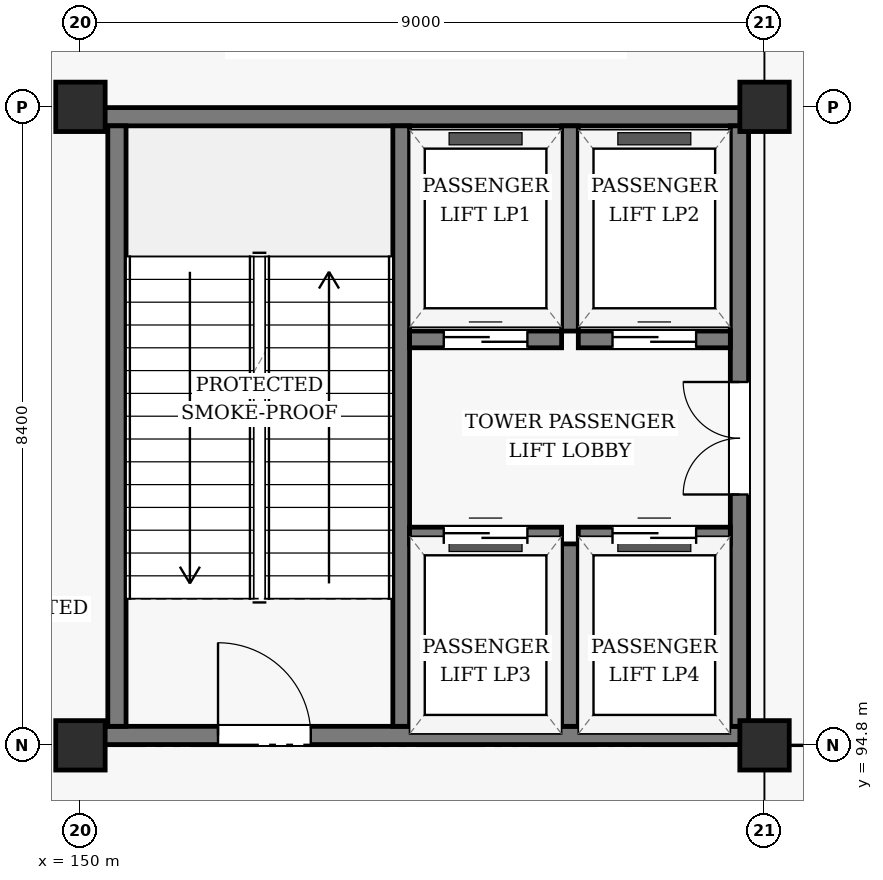
"""IFC4 building model, lengths in metres.
Left out: names, types, materials, properties, quantities, classifications, styles, units other than length and angle.
Written with IfcOpenShell. Run it as: python <this file> out.ifc"""

import sys

from ifc_helpers import new_model, si_unit, direction, frame, frame_2d, origin, origin_2d, place, context, subcontext, project, spatial, rectangle, hollow_rectangle, extrude, element, fill, save


model = new_model("IFC4")
c1 = context("Model", 3, precision=1e-05, world=origin(), true_north=direction((0.0, 1.0)))
c2 = subcontext(c1, "Body", "Model", "MODEL_VIEW")
j1 = project(units=[si_unit("LENGTHUNIT", "METRE"), si_unit("PLANEANGLEUNIT", "RADIAN")], contexts=[c1])
p1 = place(None, origin())
s1 = spatial("IfcSite", under=j1, at=p1, CompositionType="ELEMENT")
p2 = place(p1, origin())
s2 = spatial("IfcBuilding", under=s1, at=p2, CompositionType="ELEMENT")
p3 = place(p2, origin())
s3 = spatial("IfcBuildingStorey", under=s2, at=p3, CompositionType="ELEMENT", Elevation=0.0)
for number, where, z_axis, x_axis in (
    (1, (150.0, 94.8, 0.0), (0.0, 0.0, 1.0), (1.0, 0.0, 0.0)),
    (2, (150.0, 103.2, 0.0), (0.0, 0.0, 1.0), (1.0, 0.0, 0.0)),
    (3, (159.0, 94.8, 0.0), (0.0, 0.0, 1.0), (1.0, 0.0, 0.0)),
    (4, (159.0, 103.2, 0.0), (0.0, 0.0, 1.0), (1.0, 0.0, 0.0)),
):
    element("IfcColumn", number, at=place(p3, frame(where, z_axis=z_axis, x_axis=x_axis)), inside=s3, PredefinedType="COLUMN", context=c2, shape_type="SweptSolid", body=[
        extrude(hollow_rectangle(XDim=0.65, YDim=0.65, WallThickness=0.028, InnerFilletRadius=0.028, OuterFilletRadius=0.056, at=origin_2d()), origin(), (0.0, 0.0, 1.0), 4.8),
    ])
p4 = place(p3, frame((150.02, 94.93, 0.0), z_axis=(0.0, 0.0, 1.0), x_axis=(1.0, 0.0, 0.0)))
e5 = element("IfcWall", 5, at=p4, inside=s3, PredefinedType="SHEAR", context=c2, shape_type="SweptSolid", body=[
    extrude(rectangle(XDim=8.77, YDim=0.24, at=frame_2d((4.385, 0.0))), origin(), (0.0, 0.0, 1.0), 4.56),
])
p5 = place(p4, frame((1.79, 0.0, 0.0)))
e6 = element("IfcOpeningElement", 6, at=p5, cuts=e5, PredefinedType="OPENING", context=c2, shape_type="SweptSolid", body=[
    extrude(rectangle(XDim=1.22, YDim=2.18, at=frame_2d((0.61, 1.09))), frame((0.0, 0.13, 0.0), z_axis=(0.0, -1.0, 0.0), x_axis=(1.0, 0.0, 0.0)), (0.0, 0.0, 1.0), 0.26),
])
p6 = place(p3, frame((150.02, 103.07, 0.0), z_axis=(0.0, 0.0, 1.0), x_axis=(1.0, 0.0, 0.0)))
e7 = element("IfcWall", 7, at=p6, inside=s3, PredefinedType="SHEAR", context=c2, shape_type="SweptSolid", body=[
    extrude(rectangle(XDim=8.77, YDim=0.24, at=frame_2d((4.385, 0.0))), origin(), (0.0, 0.0, 1.0), 4.56),
])
p7 = place(p3, frame((150.48, 95.05, 0.0), z_axis=(0.0, 0.0, 1.0), x_axis=(0.0, 1.0, 0.0)))
e8 = element("IfcWall", 8, at=p7, inside=s3, PredefinedType="SHEAR", context=c2, shape_type="SweptSolid", body=[
    extrude(rectangle(XDim=7.9, YDim=0.24, at=frame_2d((3.95, 0.0))), origin(), (0.0, 0.0, 1.0), 4.56),
])
p8 = place(p3, frame((154.22, 95.05, 0.0), z_axis=(0.0, 0.0, 1.0), x_axis=(0.0, 1.0, 0.0)))
e9 = element("IfcWall", 9, at=p8, inside=s3, PredefinedType="SHEAR", context=c2, shape_type="SweptSolid", body=[
    extrude(rectangle(XDim=7.9, YDim=0.22, at=frame_2d((3.95, 0.0))), origin(), (0.0, 0.0, 1.0), 4.56),
])
p9 = place(p3, frame((158.67, 95.05, 0.0), z_axis=(0.0, 0.0, 1.0), x_axis=(0.0, 1.0, 0.0)))
e10 = element("IfcWall", 10, at=p9, inside=s3, PredefinedType="SHEAR", context=c2, shape_type="SweptSolid", body=[
    extrude(rectangle(XDim=7.9, YDim=0.24, at=frame_2d((3.95, 0.0))), origin(), (0.0, 0.0, 1.0), 4.56),
])
p10 = place(p9, frame((3.05, 0.0, 0.0)))
e11 = element("IfcOpeningElement", 11, at=p10, cuts=e10, PredefinedType="OPENING", context=c2, shape_type="SweptSolid", body=[
    extrude(rectangle(XDim=1.48, YDim=2.22, at=frame_2d((0.74, 1.11))), frame((0.0, 0.13, 0.0), z_axis=(0.0, -1.0, 0.0), x_axis=(1.0, 0.0, 0.0)), (0.0, 0.0, 1.0), 0.26),
])
p11 = place(p3, frame((156.44, 100.25, 0.0), z_axis=(0.0, 0.0, 1.0), x_axis=(0.0, 1.0, 0.0)))
e12 = element("IfcWall", 12, at=p11, inside=s3, PredefinedType="SHEAR", context=c2, shape_type="SweptSolid", body=[
    extrude(rectangle(XDim=2.7, YDim=0.22, at=frame_2d((1.35, 0.0))), origin(), (0.0, 0.0, 1.0), 4.56),
])
p12 = place(p3, frame((154.33, 100.14, 0.0), z_axis=(0.0, 0.0, 1.0), x_axis=(1.0, 0.0, 0.0)))
e13 = element("IfcWall", 13, at=p12, inside=s3, PredefinedType="SHEAR", context=c2, shape_type="SweptSolid", body=[
    extrude(rectangle(XDim=2.0, YDim=0.22, at=frame_2d((1.0, 0.0))), origin(), (0.0, 0.0, 1.0), 4.56),
])
p13 = place(p12, frame((0.45, 0.0, 0.0)))
e14 = element("IfcOpeningElement", 14, at=p13, cuts=e13, PredefinedType="OPENING", context=c2, shape_type="SweptSolid", body=[
    extrude(rectangle(XDim=1.1, YDim=2.15, at=frame_2d((0.55, 1.075))), frame((0.0, 0.12, 0.0), z_axis=(0.0, -1.0, 0.0), x_axis=(1.0, 0.0, 0.0)), (0.0, 0.0, 1.0), 0.24),
])
p14 = place(p3, frame((156.55, 100.14, 0.0), z_axis=(0.0, 0.0, 1.0), x_axis=(1.0, 0.0, 0.0)))
e15 = element("IfcWall", 15, at=p14, inside=s3, PredefinedType="SHEAR", context=c2, shape_type="SweptSolid", body=[
    extrude(rectangle(XDim=2.0, YDim=0.22, at=frame_2d((1.0, 0.0))), origin(), (0.0, 0.0, 1.0), 4.56),
])
p15 = place(p14, frame((0.45, 0.0, 0.0)))
e16 = element("IfcOpeningElement", 16, at=p15, cuts=e15, PredefinedType="OPENING", context=c2, shape_type="SweptSolid", body=[
    extrude(rectangle(XDim=1.1, YDim=2.15, at=frame_2d((0.55, 1.075))), frame((0.0, 0.12, 0.0), z_axis=(0.0, -1.0, 0.0), x_axis=(1.0, 0.0, 0.0)), (0.0, 0.0, 1.0), 0.24),
])
p16 = place(p3, frame((156.44, 95.05, 0.0), z_axis=(0.0, 0.0, 1.0), x_axis=(0.0, 1.0, 0.0)))
e17 = element("IfcWall", 17, at=p16, inside=s3, PredefinedType="SHEAR", context=c2, shape_type="SweptSolid", body=[
    extrude(rectangle(XDim=2.4, YDim=0.22, at=frame_2d((1.2, 0.0))), origin(), (0.0, 0.0, 1.0), 4.56),
])
p17 = place(p3, frame((154.33, 97.56, 0.0), z_axis=(0.0, 0.0, 1.0), x_axis=(1.0, 0.0, 0.0)))
e18 = element("IfcWall", 18, at=p17, inside=s3, PredefinedType="SHEAR", context=c2, shape_type="SweptSolid", body=[
    extrude(rectangle(XDim=2.0, YDim=0.22, at=frame_2d((1.0, 0.0))), origin(), (0.0, 0.0, 1.0), 4.56),
])
p18 = place(p17, frame((0.45, 0.0, 0.0)))
e19 = element("IfcOpeningElement", 19, at=p18, cuts=e18, PredefinedType="OPENING", context=c2, shape_type="SweptSolid", body=[
    extrude(rectangle(XDim=1.1, YDim=2.15, at=frame_2d((0.55, 1.075))), frame((0.0, 0.12, 0.0), z_axis=(0.0, -1.0, 0.0), x_axis=(1.0, 0.0, 0.0)), (0.0, 0.0, 1.0), 0.24),
])
p19 = place(p3, frame((156.55, 97.56, 0.0), z_axis=(0.0, 0.0, 1.0), x_axis=(1.0, 0.0, 0.0)))
e20 = element("IfcWall", 20, at=p19, inside=s3, PredefinedType="SHEAR", context=c2, shape_type="SweptSolid", body=[
    extrude(rectangle(XDim=2.0, YDim=0.22, at=frame_2d((1.0, 0.0))), origin(), (0.0, 0.0, 1.0), 4.56),
])
p20 = place(p19, frame((0.45, 0.0, 0.0)))
e21 = element("IfcOpeningElement", 21, at=p20, cuts=e20, PredefinedType="OPENING", context=c2, shape_type="SweptSolid", body=[
    extrude(rectangle(XDim=1.1, YDim=2.15, at=frame_2d((0.55, 1.075))), frame((0.0, 0.12, 0.0), z_axis=(0.0, -1.0, 0.0), x_axis=(1.0, 0.0, 0.0)), (0.0, 0.0, 1.0), 0.24),
])
p21 = place(p5, origin())
e22 = element("IfcDoor", 22, at=p21, inside=s3, OperationType="SINGLE_SWING_LEFT", PredefinedType="DOOR", context=c2, shape_type="SweptSolid", body=[
    extrude(rectangle(XDim=1.22, YDim=2.18, at=frame_2d((0.61, 1.09))), frame((0.0, 0.025, 0.0), z_axis=(0.0, -1.0, 0.0), x_axis=(1.0, 0.0, 0.0)), (0.0, 0.0, 1.0), 0.05),
])
fill(e6, e22)
p22 = place(p10, origin())
e23 = element("IfcDoor", 23, at=p22, inside=s3, OperationType="DOUBLE_DOOR_SINGLE_SWING", PredefinedType="DOOR", context=c2, shape_type="SweptSolid", body=[
    extrude(rectangle(XDim=1.48, YDim=2.22, at=frame_2d((0.74, 1.11))), frame((0.0, 0.025, 0.0), z_axis=(0.0, -1.0, 0.0), x_axis=(1.0, 0.0, 0.0)), (0.0, 0.0, 1.0), 0.05),
])
fill(e11, e23)
p23 = place(p13, origin())
e24 = element("IfcDoor", 24, at=p23, inside=s3, OperationType="SLIDING_TO_LEFT", PredefinedType="DOOR", context=c2, shape_type="SweptSolid", body=[
    extrude(rectangle(XDim=1.1, YDim=2.15, at=frame_2d((0.55, 1.075))), frame((0.0, 0.025, 0.0), z_axis=(0.0, -1.0, 0.0), x_axis=(1.0, 0.0, 0.0)), (0.0, 0.0, 1.0), 0.05),
])
fill(e14, e24)
p24 = place(p15, origin())
e25 = element("IfcDoor", 25, at=p24, inside=s3, OperationType="SLIDING_TO_LEFT", PredefinedType="DOOR", context=c2, shape_type="SweptSolid", body=[
    extrude(rectangle(XDim=1.1, YDim=2.15, at=frame_2d((0.55, 1.075))), frame((0.0, 0.025, 0.0), z_axis=(0.0, -1.0, 0.0), x_axis=(1.0, 0.0, 0.0)), (0.0, 0.0, 1.0), 0.05),
])
fill(e16, e25)
p25 = place(p18, origin())
e26 = element("IfcDoor", 26, at=p25, inside=s3, OperationType="SLIDING_TO_LEFT", PredefinedType="DOOR", context=c2, shape_type="SweptSolid", body=[
    extrude(rectangle(XDim=1.1, YDim=2.15, at=frame_2d((0.55, 1.075))), frame((0.0, 0.025, 0.0), z_axis=(0.0, -1.0, 0.0), x_axis=(1.0, 0.0, 0.0)), (0.0, 0.0, 1.0), 0.05),
])
fill(e19, e26)
p26 = place(p20, origin())
e27 = element("IfcDoor", 27, at=p26, inside=s3, OperationType="SLIDING_TO_LEFT", PredefinedType="DOOR", context=c2, shape_type="SweptSolid", body=[
    extrude(rectangle(XDim=1.1, YDim=2.15, at=frame_2d((0.55, 1.075))), frame((0.0, 0.025, 0.0), z_axis=(0.0, -1.0, 0.0), x_axis=(1.0, 0.0, 0.0)), (0.0, 0.0, 1.0), 0.05),
])
fill(e21, e27)
save(model, sys.argv[1])
